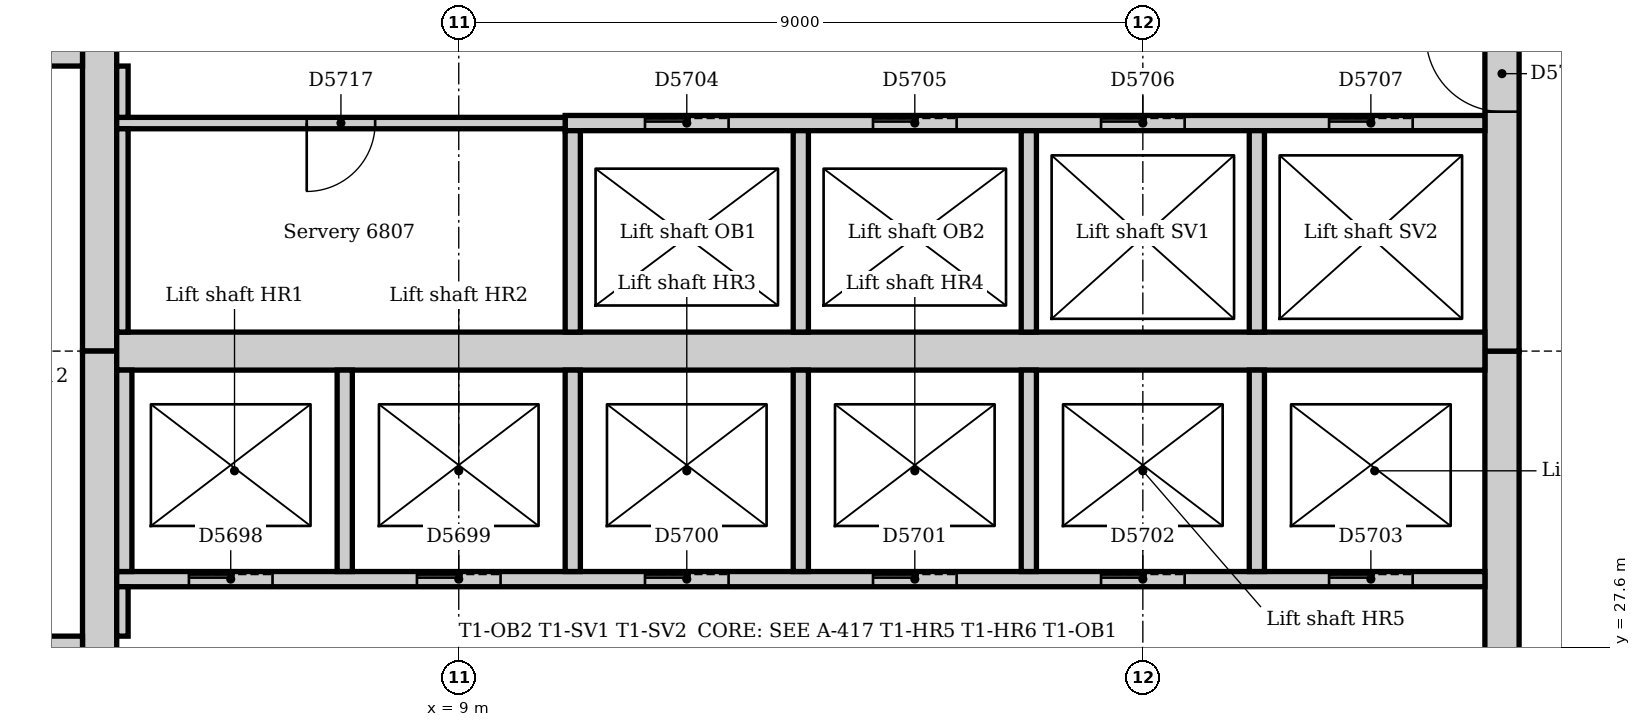
"""IFC4 building model, lengths in metres.
Left out: names, types, materials, properties, quantities, classifications, styles, units other than length and angle.
Written with IfcOpenShell. Run it as: python <this file> out.ifc"""

import sys

from ifc_helpers import new_model, si_unit, direction, frame, frame_2d, origin, place, context, subcontext, project, spatial, rectangle, extrude, element, fill, save


model = new_model("IFC4")
c1 = context("Model", 3, precision=1e-05, world=origin(), true_north=direction((0.0, 1.0)))
c2 = subcontext(c1, "Body", "Model", "MODEL_VIEW")
j1 = project(units=[si_unit("LENGTHUNIT", "METRE"), si_unit("PLANEANGLEUNIT", "RADIAN")], contexts=[c1])
p1 = place(None, origin())
s1 = spatial("IfcSite", under=j1, at=p1, CompositionType="ELEMENT")
p2 = place(p1, origin())
s2 = spatial("IfcBuilding", under=s1, at=p2, CompositionType="ELEMENT")
p3 = place(p2, frame((0.0, 0.0, 283.0)))
s3 = spatial("IfcBuildingStorey", under=s2, at=p3, CompositionType="ELEMENT", Elevation=283.0)
p4 = place(p3, frame((22.725, 21.0, 0.0), z_axis=(0.0, 0.0, 1.0), x_axis=(0.0, 1.0, 0.0)))
e1 = element("IfcWall", 1, at=p4, inside=s3, PredefinedType="SOLIDWALL", context=c2, shape_type="SweptSolid", body=[
    extrude(rectangle(XDim=10.5, YDim=0.45, at=frame_2d((5.25, 0.0))), origin(), (0.0, 0.0, 1.0), 8.0),
])
p5 = place(p4, frame((4.35, 0.0, 0.0)))
e2 = element("IfcOpeningElement", 2, at=p5, cuts=e1, PredefinedType="OPENING", context=c2, shape_type="SweptSolid", body=[
    extrude(rectangle(XDim=1.8, YDim=2.1, at=frame_2d((0.9, 1.05))), frame((0.0, 0.235, 0.0), z_axis=(0.0, -1.0, 0.0), x_axis=(1.0, 0.0, 0.0)), (0.0, 0.0, 1.0), 0.47),
])
p6 = place(p3, frame((22.725, 31.5, 0.0), z_axis=(0.0, 0.0, 1.0), x_axis=(0.0, 1.0, 0.0)))
e3 = element("IfcWall", 3, at=p6, inside=s3, PredefinedType="SOLIDWALL", context=c2, shape_type="SweptSolid", body=[
    extrude(rectangle(XDim=10.5, YDim=0.45, at=frame_2d((5.25, 0.0))), origin(), (0.0, 0.0, 1.0), 8.0),
])
p7 = place(p6, frame((3.15, 0.0, 0.0)))
e4 = element("IfcOpeningElement", 4, at=p7, cuts=e3, PredefinedType="OPENING", context=c2, shape_type="SweptSolid", body=[
    extrude(rectangle(XDim=1.0, YDim=2.1, at=frame_2d((0.5, 1.05))), frame((0.0, 0.235, 0.0), z_axis=(0.0, -1.0, 0.0), x_axis=(1.0, 0.0, 0.0)), (0.0, 0.0, 1.0), 0.47),
])
p8 = place(p6, frame((5.2, 0.0, 0.0)))
e5 = element("IfcOpeningElement", 5, at=p8, cuts=e3, PredefinedType="OPENING", context=c2, shape_type="SweptSolid", body=[
    extrude(rectangle(XDim=1.0, YDim=2.1, at=frame_2d((0.5, 1.05))), frame((0.0, 0.235, 0.0), z_axis=(0.0, -1.0, 0.0), x_axis=(1.0, 0.0, 0.0)), (0.0, 0.0, 1.0), 0.47),
])
p9 = place(p3, frame((4.275, 42.0, 0.0), z_axis=(0.0, 0.0, 1.0), x_axis=(0.0, -1.0, 0.0)))
e6 = element("IfcWall", 6, at=p9, inside=s3, PredefinedType="SOLIDWALL", context=c2, shape_type="SweptSolid", body=[
    extrude(rectangle(XDim=10.5, YDim=0.45, at=frame_2d((5.25, 0.0))), origin(), (0.0, 0.0, 1.0), 8.0),
])
p10 = place(p9, frame((5.3, 0.0, 0.0)))
e7 = element("IfcOpeningElement", 7, at=p10, cuts=e6, PredefinedType="OPENING", context=c2, shape_type="SweptSolid", body=[
    extrude(rectangle(XDim=1.0, YDim=2.1, at=frame_2d((0.5, 1.05))), frame((0.0, 0.235, 0.0), z_axis=(0.0, -1.0, 0.0), x_axis=(1.0, 0.0, 0.0)), (0.0, 0.0, 1.0), 0.47),
])
p11 = place(p3, frame((4.275, 31.5, 0.0), z_axis=(0.0, 0.0, 1.0), x_axis=(0.0, -1.0, 0.0)))
e8 = element("IfcWall", 8, at=p11, inside=s3, PredefinedType="SOLIDWALL", context=c2, shape_type="SweptSolid", body=[
    extrude(rectangle(XDim=10.5, YDim=0.45, at=frame_2d((5.25, 0.0))), origin(), (0.0, 0.0, 1.0), 8.0),
])
p12 = place(p11, frame((4.25, 0.0, 0.0)))
e9 = element("IfcOpeningElement", 9, at=p12, cuts=e8, PredefinedType="OPENING", context=c2, shape_type="SweptSolid", body=[
    extrude(rectangle(XDim=1.0, YDim=2.1, at=frame_2d((0.5, 1.05))), frame((0.0, 0.235, 0.0), z_axis=(0.0, -1.0, 0.0), x_axis=(1.0, 0.0, 0.0)), (0.0, 0.0, 1.0), 0.47),
])
p13 = place(p3, frame((4.5, 31.5, 0.0), z_axis=(0.0, 0.0, 1.0), x_axis=(1.0, 0.0, 0.0)))
e10 = element("IfcWall", 10, at=p13, inside=s3, PredefinedType="SOLIDWALL", context=c2, shape_type="SweptSolid", body=[
    extrude(rectangle(XDim=18.0, YDim=0.5, at=frame_2d((9.0, 0.0))), origin(), (0.0, 0.0, 1.0), 8.0),
])
p14 = place(p3, frame((4.05, 27.625, 0.0), z_axis=(0.0, 0.0, 1.0), x_axis=(-1.0, 0.0, 0.0)))
e11 = element("IfcWall", 11, at=p14, inside=s3, PredefinedType="SOLIDWALL", context=c2, shape_type="SweptSolid", body=[
    extrude(rectangle(XDim=3.69, YDim=0.25, at=frame_2d((1.845, 0.0))), origin(), (0.0, 0.0, 1.0), 8.0),
])
p15 = place(p14, frame((0.55, 0.0, 0.0)))
e12 = element("IfcOpeningElement", 12, at=p15, cuts=e11, PredefinedType="OPENING", context=c2, shape_type="SweptSolid", body=[
    extrude(rectangle(XDim=1.0, YDim=2.1, at=frame_2d((0.5, 1.05))), frame((0.0, 0.135, 0.0), z_axis=(0.0, -1.0, 0.0), x_axis=(1.0, 0.0, 0.0)), (0.0, 0.0, 1.0), 0.27),
])
p16 = place(p3, frame((0.36, 35.375, 0.0), z_axis=(0.0, 0.0, 1.0), x_axis=(1.0, 0.0, 0.0)))
e13 = element("IfcWall", 13, at=p16, inside=s3, PredefinedType="SOLIDWALL", context=c2, shape_type="SweptSolid", body=[
    extrude(rectangle(XDim=3.69, YDim=0.25, at=frame_2d((1.845, 0.0))), origin(), (0.0, 0.0, 1.0), 8.0),
])
p17 = place(p16, frame((2.14, 0.0, 0.0)))
e14 = element("IfcOpeningElement", 14, at=p17, cuts=e13, PredefinedType="OPENING", context=c2, shape_type="SweptSolid", body=[
    extrude(rectangle(XDim=1.0, YDim=2.1, at=frame_2d((0.5, 1.05))), frame((0.0, 0.135, 0.0), z_axis=(0.0, -1.0, 0.0), x_axis=(1.0, 0.0, 0.0)), (0.0, 0.0, 1.0), 0.27),
])
p18 = place(p3, frame((4.5, 28.5, 0.0), z_axis=(0.0, 0.0, 1.0), x_axis=(1.0, 0.0, 0.0)))
e15 = element("IfcWall", 15, at=p18, inside=s3, PredefinedType="PARTITIONING", context=c2, shape_type="SweptSolid", body=[
    extrude(rectangle(XDim=18.0, YDim=0.2, at=frame_2d((9.0, 0.0))), origin(), (0.0, 0.0, 1.0), 7.7),
])
p19 = place(p18, frame((0.95, 0.0, 0.0)))
e16 = element("IfcOpeningElement", 16, at=p19, cuts=e15, PredefinedType="OPENING", context=c2, shape_type="SweptSolid", body=[
    extrude(rectangle(XDim=1.1, YDim=2.1, at=frame_2d((0.55, 1.05))), frame((0.0, 0.11, 0.0), z_axis=(0.0, -1.0, 0.0), x_axis=(1.0, 0.0, 0.0)), (0.0, 0.0, 1.0), 0.22),
])
p20 = place(p18, frame((3.95, 0.0, 0.0)))
e17 = element("IfcOpeningElement", 17, at=p20, cuts=e15, PredefinedType="OPENING", context=c2, shape_type="SweptSolid", body=[
    extrude(rectangle(XDim=1.1, YDim=2.1, at=frame_2d((0.55, 1.05))), frame((0.0, 0.11, 0.0), z_axis=(0.0, -1.0, 0.0), x_axis=(1.0, 0.0, 0.0)), (0.0, 0.0, 1.0), 0.22),
])
p21 = place(p18, frame((6.95, 0.0, 0.0)))
e18 = element("IfcOpeningElement", 18, at=p21, cuts=e15, PredefinedType="OPENING", context=c2, shape_type="SweptSolid", body=[
    extrude(rectangle(XDim=1.1, YDim=2.1, at=frame_2d((0.55, 1.05))), frame((0.0, 0.11, 0.0), z_axis=(0.0, -1.0, 0.0), x_axis=(1.0, 0.0, 0.0)), (0.0, 0.0, 1.0), 0.22),
])
p22 = place(p18, frame((9.95, 0.0, 0.0)))
e19 = element("IfcOpeningElement", 19, at=p22, cuts=e15, PredefinedType="OPENING", context=c2, shape_type="SweptSolid", body=[
    extrude(rectangle(XDim=1.1, YDim=2.1, at=frame_2d((0.55, 1.05))), frame((0.0, 0.11, 0.0), z_axis=(0.0, -1.0, 0.0), x_axis=(1.0, 0.0, 0.0)), (0.0, 0.0, 1.0), 0.22),
])
p23 = place(p18, frame((12.95, 0.0, 0.0)))
e20 = element("IfcOpeningElement", 20, at=p23, cuts=e15, PredefinedType="OPENING", context=c2, shape_type="SweptSolid", body=[
    extrude(rectangle(XDim=1.1, YDim=2.1, at=frame_2d((0.55, 1.05))), frame((0.0, 0.11, 0.0), z_axis=(0.0, -1.0, 0.0), x_axis=(1.0, 0.0, 0.0)), (0.0, 0.0, 1.0), 0.22),
])
p24 = place(p18, frame((15.95, 0.0, 0.0)))
e21 = element("IfcOpeningElement", 21, at=p24, cuts=e15, PredefinedType="OPENING", context=c2, shape_type="SweptSolid", body=[
    extrude(rectangle(XDim=1.1, YDim=2.1, at=frame_2d((0.55, 1.05))), frame((0.0, 0.11, 0.0), z_axis=(0.0, -1.0, 0.0), x_axis=(1.0, 0.0, 0.0)), (0.0, 0.0, 1.0), 0.22),
])
p25 = place(p3, frame((10.4, 34.5, 0.0), z_axis=(0.0, 0.0, 1.0), x_axis=(1.0, 0.0, 0.0)))
e22 = element("IfcWall", 22, at=p25, inside=s3, PredefinedType="PARTITIONING", context=c2, shape_type="SweptSolid", body=[
    extrude(rectangle(XDim=12.1, YDim=0.2, at=frame_2d((6.05, 0.0))), origin(), (0.0, 0.0, 1.0), 7.7),
])
p26 = place(p25, frame((1.05, 0.0, 0.0)))
e23 = element("IfcOpeningElement", 23, at=p26, cuts=e22, PredefinedType="OPENING", context=c2, shape_type="SweptSolid", body=[
    extrude(rectangle(XDim=1.1, YDim=2.1, at=frame_2d((0.55, 1.05))), frame((0.0, 0.11, 0.0), z_axis=(0.0, -1.0, 0.0), x_axis=(1.0, 0.0, 0.0)), (0.0, 0.0, 1.0), 0.22),
])
p27 = place(p25, frame((4.05, 0.0, 0.0)))
e24 = element("IfcOpeningElement", 24, at=p27, cuts=e22, PredefinedType="OPENING", context=c2, shape_type="SweptSolid", body=[
    extrude(rectangle(XDim=1.1, YDim=2.1, at=frame_2d((0.55, 1.05))), frame((0.0, 0.11, 0.0), z_axis=(0.0, -1.0, 0.0), x_axis=(1.0, 0.0, 0.0)), (0.0, 0.0, 1.0), 0.22),
])
p28 = place(p25, frame((7.05, 0.0, 0.0)))
e25 = element("IfcOpeningElement", 25, at=p28, cuts=e22, PredefinedType="OPENING", context=c2, shape_type="SweptSolid", body=[
    extrude(rectangle(XDim=1.1, YDim=2.1, at=frame_2d((0.55, 1.05))), frame((0.0, 0.11, 0.0), z_axis=(0.0, -1.0, 0.0), x_axis=(1.0, 0.0, 0.0)), (0.0, 0.0, 1.0), 0.22),
])
p29 = place(p25, frame((10.05, 0.0, 0.0)))
e26 = element("IfcOpeningElement", 26, at=p29, cuts=e22, PredefinedType="OPENING", context=c2, shape_type="SweptSolid", body=[
    extrude(rectangle(XDim=1.1, YDim=2.1, at=frame_2d((0.55, 1.05))), frame((0.0, 0.11, 0.0), z_axis=(0.0, -1.0, 0.0), x_axis=(1.0, 0.0, 0.0)), (0.0, 0.0, 1.0), 0.22),
])
for number, where, z_axis, x_axis in (
    (27, (10.5, 28.6, 0.0), (0.0, 0.0, 1.0), (0.0, 1.0, 0.0)),
    (28, (10.5, 31.75, 0.0), (0.0, 0.0, 1.0), (0.0, 1.0, 0.0)),
    (29, (13.5, 28.6, 0.0), (0.0, 0.0, 1.0), (0.0, 1.0, 0.0)),
    (30, (13.5, 31.75, 0.0), (0.0, 0.0, 1.0), (0.0, 1.0, 0.0)),
    (31, (16.5, 28.6, 0.0), (0.0, 0.0, 1.0), (0.0, 1.0, 0.0)),
    (32, (16.5, 31.75, 0.0), (0.0, 0.0, 1.0), (0.0, 1.0, 0.0)),
    (33, (19.5, 28.6, 0.0), (0.0, 0.0, 1.0), (0.0, 1.0, 0.0)),
    (34, (19.5, 31.75, 0.0), (0.0, 0.0, 1.0), (0.0, 1.0, 0.0)),
    (35, (4.6, 28.6, 0.0), (0.0, 0.0, 1.0), (0.0, 1.0, 0.0)),
    (36, (7.5, 28.6, 0.0), (0.0, 0.0, 1.0), (0.0, 1.0, 0.0)),
):
    element("IfcWall", number, at=place(p3, frame(where, z_axis=z_axis, x_axis=x_axis)), inside=s3, PredefinedType="PARTITIONING", context=c2, shape_type="SweptSolid", body=[
        extrude(rectangle(XDim=2.65, YDim=0.2, at=frame_2d((1.325, 0.0))), origin(), (0.0, 0.0, 1.0), 7.7),
    ])
p30 = place(p3, frame((4.5, 34.5, 0.0), z_axis=(0.0, 0.0, 1.0), x_axis=(1.0, 0.0, 0.0)))
e37 = element("IfcWall", 37, at=p30, inside=s3, PredefinedType="PARTITIONING", context=c2, shape_type="SweptSolid", body=[
    extrude(rectangle(XDim=5.9, YDim=0.15, at=frame_2d((2.95, 0.0))), origin(), (0.0, 0.0, 1.0), 7.7),
])
p31 = place(p30, frame((2.5, 0.0, 0.0)))
e38 = element("IfcOpeningElement", 38, at=p31, cuts=e37, PredefinedType="OPENING", context=c2, shape_type="SweptSolid", body=[
    extrude(rectangle(XDim=0.9, YDim=2.1, at=frame_2d((0.45, 1.05))), frame((0.0, 0.085, 0.0), z_axis=(0.0, -1.0, 0.0), x_axis=(1.0, 0.0, 0.0)), (0.0, 0.0, 1.0), 0.17),
])
p32 = place(p3, frame((4.575, 34.575, 0.0), z_axis=(0.0, 0.0, 1.0), x_axis=(0.0, 1.0, 0.0)))
e39 = element("IfcWall", 39, at=p32, inside=s3, PredefinedType="PARTITIONING", context=c2, shape_type="SweptSolid", body=[
    extrude(rectangle(XDim=0.675, YDim=0.15, at=frame_2d((0.338, 0.0))), origin(), (0.0, 0.0, 1.0), 7.7),
])
p33 = place(p3, frame((4.575, 31.75, 0.0), z_axis=(0.0, 0.0, 1.0), x_axis=(0.0, 1.0, 0.0)))
e40 = element("IfcWall", 40, at=p33, inside=s3, PredefinedType="PARTITIONING", context=c2, shape_type="SweptSolid", body=[
    extrude(rectangle(XDim=2.675, YDim=0.15, at=frame_2d((1.337, 0.0))), origin(), (0.0, 0.0, 1.0), 7.7),
])
p34 = place(p3, frame((4.575, 27.75, 0.0), z_axis=(0.0, 0.0, 1.0), x_axis=(0.0, 1.0, 0.0)))
e41 = element("IfcWall", 41, at=p34, inside=s3, PredefinedType="PARTITIONING", context=c2, shape_type="SweptSolid", body=[
    extrude(rectangle(XDim=0.65, YDim=0.15, at=frame_2d((0.325, 0.0))), origin(), (0.0, 0.0, 1.0), 7.7),
])
p35 = place(p19, origin())
e42 = element("IfcDoor", 42, at=p35, inside=s3, OperationType="SLIDING_TO_LEFT", PredefinedType="DOOR", context=c2, shape_type="SweptSolid", body=[
    extrude(rectangle(XDim=1.1, YDim=2.1, at=frame_2d((0.55, 1.05))), frame((0.0, 0.025, 0.0), z_axis=(0.0, -1.0, 0.0), x_axis=(1.0, 0.0, 0.0)), (0.0, 0.0, 1.0), 0.05),
])
fill(e16, e42)
p36 = place(p20, origin())
e43 = element("IfcDoor", 43, at=p36, inside=s3, OperationType="SLIDING_TO_LEFT", PredefinedType="DOOR", context=c2, shape_type="SweptSolid", body=[
    extrude(rectangle(XDim=1.1, YDim=2.1, at=frame_2d((0.55, 1.05))), frame((0.0, 0.025, 0.0), z_axis=(0.0, -1.0, 0.0), x_axis=(1.0, 0.0, 0.0)), (0.0, 0.0, 1.0), 0.05),
])
fill(e17, e43)
p37 = place(p21, origin())
e44 = element("IfcDoor", 44, at=p37, inside=s3, OperationType="SLIDING_TO_LEFT", PredefinedType="DOOR", context=c2, shape_type="SweptSolid", body=[
    extrude(rectangle(XDim=1.1, YDim=2.1, at=frame_2d((0.55, 1.05))), frame((0.0, 0.025, 0.0), z_axis=(0.0, -1.0, 0.0), x_axis=(1.0, 0.0, 0.0)), (0.0, 0.0, 1.0), 0.05),
])
fill(e18, e44)
p38 = place(p22, origin())
e45 = element("IfcDoor", 45, at=p38, inside=s3, OperationType="SLIDING_TO_LEFT", PredefinedType="DOOR", context=c2, shape_type="SweptSolid", body=[
    extrude(rectangle(XDim=1.1, YDim=2.1, at=frame_2d((0.55, 1.05))), frame((0.0, 0.025, 0.0), z_axis=(0.0, -1.0, 0.0), x_axis=(1.0, 0.0, 0.0)), (0.0, 0.0, 1.0), 0.05),
])
fill(e19, e45)
p39 = place(p23, origin())
e46 = element("IfcDoor", 46, at=p39, inside=s3, OperationType="SLIDING_TO_LEFT", PredefinedType="DOOR", context=c2, shape_type="SweptSolid", body=[
    extrude(rectangle(XDim=1.1, YDim=2.1, at=frame_2d((0.55, 1.05))), frame((0.0, 0.025, 0.0), z_axis=(0.0, -1.0, 0.0), x_axis=(1.0, 0.0, 0.0)), (0.0, 0.0, 1.0), 0.05),
])
fill(e20, e46)
p40 = place(p24, origin())
e47 = element("IfcDoor", 47, at=p40, inside=s3, OperationType="SLIDING_TO_LEFT", PredefinedType="DOOR", context=c2, shape_type="SweptSolid", body=[
    extrude(rectangle(XDim=1.1, YDim=2.1, at=frame_2d((0.55, 1.05))), frame((0.0, 0.025, 0.0), z_axis=(0.0, -1.0, 0.0), x_axis=(1.0, 0.0, 0.0)), (0.0, 0.0, 1.0), 0.05),
])
fill(e21, e47)
p41 = place(p26, origin())
e48 = element("IfcDoor", 48, at=p41, inside=s3, OperationType="SLIDING_TO_LEFT", PredefinedType="DOOR", context=c2, shape_type="SweptSolid", body=[
    extrude(rectangle(XDim=1.1, YDim=2.1, at=frame_2d((0.55, 1.05))), frame((0.0, 0.025, 0.0), z_axis=(0.0, -1.0, 0.0), x_axis=(1.0, 0.0, 0.0)), (0.0, 0.0, 1.0), 0.05),
])
fill(e23, e48)
p42 = place(p27, origin())
e49 = element("IfcDoor", 49, at=p42, inside=s3, OperationType="SLIDING_TO_LEFT", PredefinedType="DOOR", context=c2, shape_type="SweptSolid", body=[
    extrude(rectangle(XDim=1.1, YDim=2.1, at=frame_2d((0.55, 1.05))), frame((0.0, 0.025, 0.0), z_axis=(0.0, -1.0, 0.0), x_axis=(1.0, 0.0, 0.0)), (0.0, 0.0, 1.0), 0.05),
])
fill(e24, e49)
p43 = place(p28, origin())
e50 = element("IfcDoor", 50, at=p43, inside=s3, OperationType="SLIDING_TO_LEFT", PredefinedType="DOOR", context=c2, shape_type="SweptSolid", body=[
    extrude(rectangle(XDim=1.1, YDim=2.1, at=frame_2d((0.55, 1.05))), frame((0.0, 0.025, 0.0), z_axis=(0.0, -1.0, 0.0), x_axis=(1.0, 0.0, 0.0)), (0.0, 0.0, 1.0), 0.05),
])
fill(e25, e50)
p44 = place(p29, origin())
e51 = element("IfcDoor", 51, at=p44, inside=s3, OperationType="SLIDING_TO_LEFT", PredefinedType="DOOR", context=c2, shape_type="SweptSolid", body=[
    extrude(rectangle(XDim=1.1, YDim=2.1, at=frame_2d((0.55, 1.05))), frame((0.0, 0.025, 0.0), z_axis=(0.0, -1.0, 0.0), x_axis=(1.0, 0.0, 0.0)), (0.0, 0.0, 1.0), 0.05),
])
fill(e26, e51)
p45 = place(p7, origin())
e52 = element("IfcDoor", 52, at=p45, inside=s3, OperationType="SINGLE_SWING_RIGHT", PredefinedType="DOOR", context=c2, shape_type="SweptSolid", body=[
    extrude(rectangle(XDim=1.0, YDim=2.1, at=frame_2d((0.5, 1.05))), frame((0.0, 0.025, 0.0), z_axis=(0.0, -1.0, 0.0), x_axis=(1.0, 0.0, 0.0)), (0.0, 0.0, 1.0), 0.05),
])
fill(e4, e52)
p46 = place(p31, frame((0.9, 0.0, 0.0), z_axis=(0.0, 0.0, 1.0), x_axis=(-1.0, 0.0, 0.0)))
e53 = element("IfcDoor", 53, at=p46, inside=s3, OperationType="SINGLE_SWING_RIGHT", PredefinedType="DOOR", context=c2, shape_type="SweptSolid", body=[
    extrude(rectangle(XDim=0.9, YDim=2.1, at=frame_2d((0.45, 1.05))), frame((0.0, 0.025, 0.0), z_axis=(0.0, -1.0, 0.0), x_axis=(1.0, 0.0, 0.0)), (0.0, 0.0, 1.0), 0.05),
])
fill(e38, e53)
save(model, sys.argv[1])
